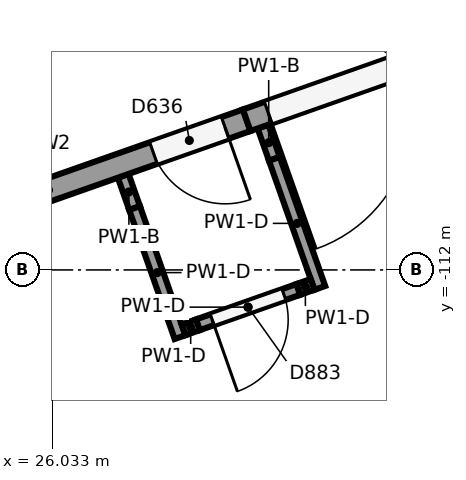
"""IFC4 building model, lengths in metres.
Left out: names, types, materials, properties, quantities, classifications, styles, units other than length and angle.
Written with IfcOpenShell. Run it as: python <this file> out.ifc"""

import sys

from ifc_helpers import new_model, si_unit, direction, frame, frame_2d, origin, place, context, subcontext, project, spatial, rectangle, extrude, element, fill, save


model = new_model("IFC4")
c1 = context("Model", 3, precision=1e-05, world=origin(), true_north=direction((0.0, 1.0)))
c2 = subcontext(c1, "Body", "Model", "MODEL_VIEW")
j1 = project(units=[si_unit("LENGTHUNIT", "METRE"), si_unit("PLANEANGLEUNIT", "RADIAN")], contexts=[c1])
p1 = place(None, origin())
s1 = spatial("IfcSite", under=j1, at=p1, CompositionType="ELEMENT")
p2 = place(p1, origin())
s2 = spatial("IfcBuilding", under=s1, at=p2, CompositionType="ELEMENT")
p3 = place(p2, origin())
s3 = spatial("IfcBuildingStorey", under=s2, at=p3, CompositionType="ELEMENT", Elevation=0.0)
p4 = place(p3, frame((32.742, -108.569, 0.0), z_axis=(0.0, 0.0, 1.0), x_axis=(-0.943210364758, -0.332196038226, 0.0)))
e1 = element("IfcWall", 1, at=p4, inside=s3, PredefinedType="SOLIDWALL", context=c2, shape_type="SweptSolid", body=[
    extrude(rectangle(XDim=4.4, YDim=0.3, at=frame_2d((2.2, 0.0))), origin(), (0.0, 0.0, 1.0), 4.85),
])
p5 = place(p4, frame((0.3, 0.0, 0.0)))
e2 = element("IfcOpeningElement", 2, at=p5, cuts=e1, PredefinedType="OPENING", context=c2, shape_type="SweptSolid", body=[
    extrude(rectangle(XDim=3.8, YDim=2.8, at=frame_2d((1.9, 1.4))), frame((0.0, 0.16, 0.0), z_axis=(0.0, -1.0, 0.0), x_axis=(1.0, 0.0, 0.0)), (0.0, 0.0, 1.0), 0.32),
])
p6 = place(p3, frame((28.592, -110.031, 0.0), z_axis=(0.0, 0.0, 1.0), x_axis=(-0.943213513301, -0.332187098373, 0.0)))
e3 = element("IfcWall", 3, at=p6, inside=s3, PredefinedType="SOLIDWALL", context=c2, shape_type="SweptSolid", body=[
    extrude(rectangle(XDim=5.528, YDim=0.3, at=frame_2d((2.764, 0.0))), origin(), (0.0, 0.0, 1.0), 4.85),
])
p7 = place(p6, frame((0.3, 0.0, 0.0)))
e4 = element("IfcOpeningElement", 4, at=p7, cuts=e3, PredefinedType="OPENING", context=c2, shape_type="SweptSolid", body=[
    extrude(rectangle(XDim=1.0, YDim=2.1, at=frame_2d((0.5, 1.05))), frame((0.0, 0.16, 0.0), z_axis=(0.0, -1.0, 0.0), x_axis=(1.0, 0.0, 0.0)), (0.0, 0.0, 1.0), 0.32),
])
p8 = place(p3, frame((28.806, -110.114, 0.0), z_axis=(0.0, 0.0, 1.0), x_axis=(0.332621430713, -0.943060434877, 0.0)))
e5 = element("IfcWall", 5, at=p8, inside=s3, PredefinedType="PARTITIONING", context=c2, shape_type="SweptSolid", body=[
    extrude(rectangle(XDim=0.45, YDim=0.15, at=frame_2d((0.225, 0.0))), origin(), (0.0, 0.0, 1.0), 4.85),
])
p9 = place(p3, frame((28.956, -110.539, 0.0), z_axis=(0.0, 0.0, 1.0), x_axis=(0.332174408782, -0.943217982308, 0.0)))
e6 = element("IfcWall", 6, at=p9, inside=s3, PredefinedType="PARTITIONING", context=c2, shape_type="SweptSolid", body=[
    extrude(rectangle(XDim=1.8, YDim=0.15, at=frame_2d((0.9, 0.0))), origin(), (0.0, 0.0, 1.0), 6.1),
])
p10 = place(p3, frame((26.967, -110.762, 0.0), z_axis=(0.0, 0.0, 1.0), x_axis=(0.332138720672, -0.943230549882, 0.0)))
e7 = element("IfcWall", 7, at=p10, inside=s3, PredefinedType="PARTITIONING", context=c2, shape_type="SweptSolid", body=[
    extrude(rectangle(XDim=0.45, YDim=0.15, at=frame_2d((0.225, 0.0))), origin(), (0.0, 0.0, 1.0), 4.85),
])
p11 = place(p3, frame((27.117, -111.186, 0.0), z_axis=(0.0, 0.0, 1.0), x_axis=(0.332174408782, -0.943217982308, 0.0)))
e8 = element("IfcWall", 8, at=p11, inside=s3, PredefinedType="PARTITIONING", context=c2, shape_type="SweptSolid", body=[
    extrude(rectangle(XDim=1.8, YDim=0.15, at=frame_2d((0.9, 0.0))), origin(), (0.0, 0.0, 1.0), 6.1),
])
p12 = place(p3, frame((29.458, -112.191, 0.0), z_axis=(0.0, 0.0, 1.0), x_axis=(-0.94330531524, -0.331926320498, 0.0)))
e9 = element("IfcWall", 9, at=p12, inside=s3, PredefinedType="PARTITIONING", context=c2, shape_type="SweptSolid", body=[
    extrude(rectangle(XDim=0.2, YDim=0.15, at=frame_2d((0.1, 0.0))), origin(), (0.0, 0.0, 1.0), 6.1),
])
p13 = place(p3, frame((29.27, -112.257, 0.0), z_axis=(0.0, 0.0, 1.0), x_axis=(-0.943247651759, -0.332090149584, 0.0)))
e10 = element("IfcWall", 10, at=p13, inside=s3, PredefinedType="PARTITIONING", context=c2, shape_type="SweptSolid", body=[
    extrude(rectangle(XDim=1.4, YDim=0.15, at=frame_2d((0.7, 0.0))), origin(), (0.0, 0.0, 1.0), 6.1),
])
p14 = place(p13, frame((0.2, 0.0, 0.0)))
e11 = element("IfcOpeningElement", 11, at=p14, cuts=e10, PredefinedType="OPENING", context=c2, shape_type="SweptSolid", body=[
    extrude(rectangle(XDim=1.0, YDim=2.1, at=frame_2d((0.5, 1.05))), frame((0.0, 0.085, 0.0), z_axis=(0.0, -1.0, 0.0), x_axis=(1.0, 0.0, 0.0)), (0.0, 0.0, 1.0), 0.17),
])
p15 = place(p3, frame((27.949, -112.722, 0.0), z_axis=(0.0, 0.0, 1.0), x_axis=(-0.942922754758, -0.333011529171, 0.0)))
e12 = element("IfcWall", 12, at=p15, inside=s3, PredefinedType="PARTITIONING", context=c2, shape_type="SweptSolid", body=[
    extrude(rectangle(XDim=0.2, YDim=0.15, at=frame_2d((0.1, 0.0))), origin(), (0.0, 0.0, 1.0), 6.1),
])
p16 = place(p5, origin())
e13 = element("IfcDoor", 13, at=p16, inside=s3, OperationType="DOUBLE_DOOR_SINGLE_SWING", PredefinedType="DOOR", context=c2, shape_type="SweptSolid", body=[
    extrude(rectangle(XDim=3.8, YDim=2.8, at=frame_2d((1.9, 1.4))), frame((0.0, 0.025, 0.0), z_axis=(0.0, -1.0, 0.0), x_axis=(1.0, 0.0, 0.0)), (0.0, 0.0, 1.0), 0.05),
])
fill(e2, e13)
p17 = place(p7, origin())
e14 = element("IfcDoor", 14, at=p17, inside=s3, OperationType="SINGLE_SWING_LEFT", PredefinedType="DOOR", context=c2, shape_type="SweptSolid", body=[
    extrude(rectangle(XDim=1.0, YDim=2.1, at=frame_2d((0.5, 1.05))), frame((0.0, 0.025, 0.0), z_axis=(0.0, -1.0, 0.0), x_axis=(1.0, 0.0, 0.0)), (0.0, 0.0, 1.0), 0.05),
])
fill(e4, e14)
p18 = place(p14, origin())
e15 = element("IfcDoor", 15, at=p18, inside=s3, OperationType="SINGLE_SWING_RIGHT", PredefinedType="DOOR", context=c2, shape_type="SweptSolid", body=[
    extrude(rectangle(XDim=1.0, YDim=2.1, at=frame_2d((0.5, 1.05))), frame((0.0, 0.025, 0.0), z_axis=(0.0, -1.0, 0.0), x_axis=(1.0, 0.0, 0.0)), (0.0, 0.0, 1.0), 0.05),
])
fill(e11, e15)
save(model, sys.argv[1])
